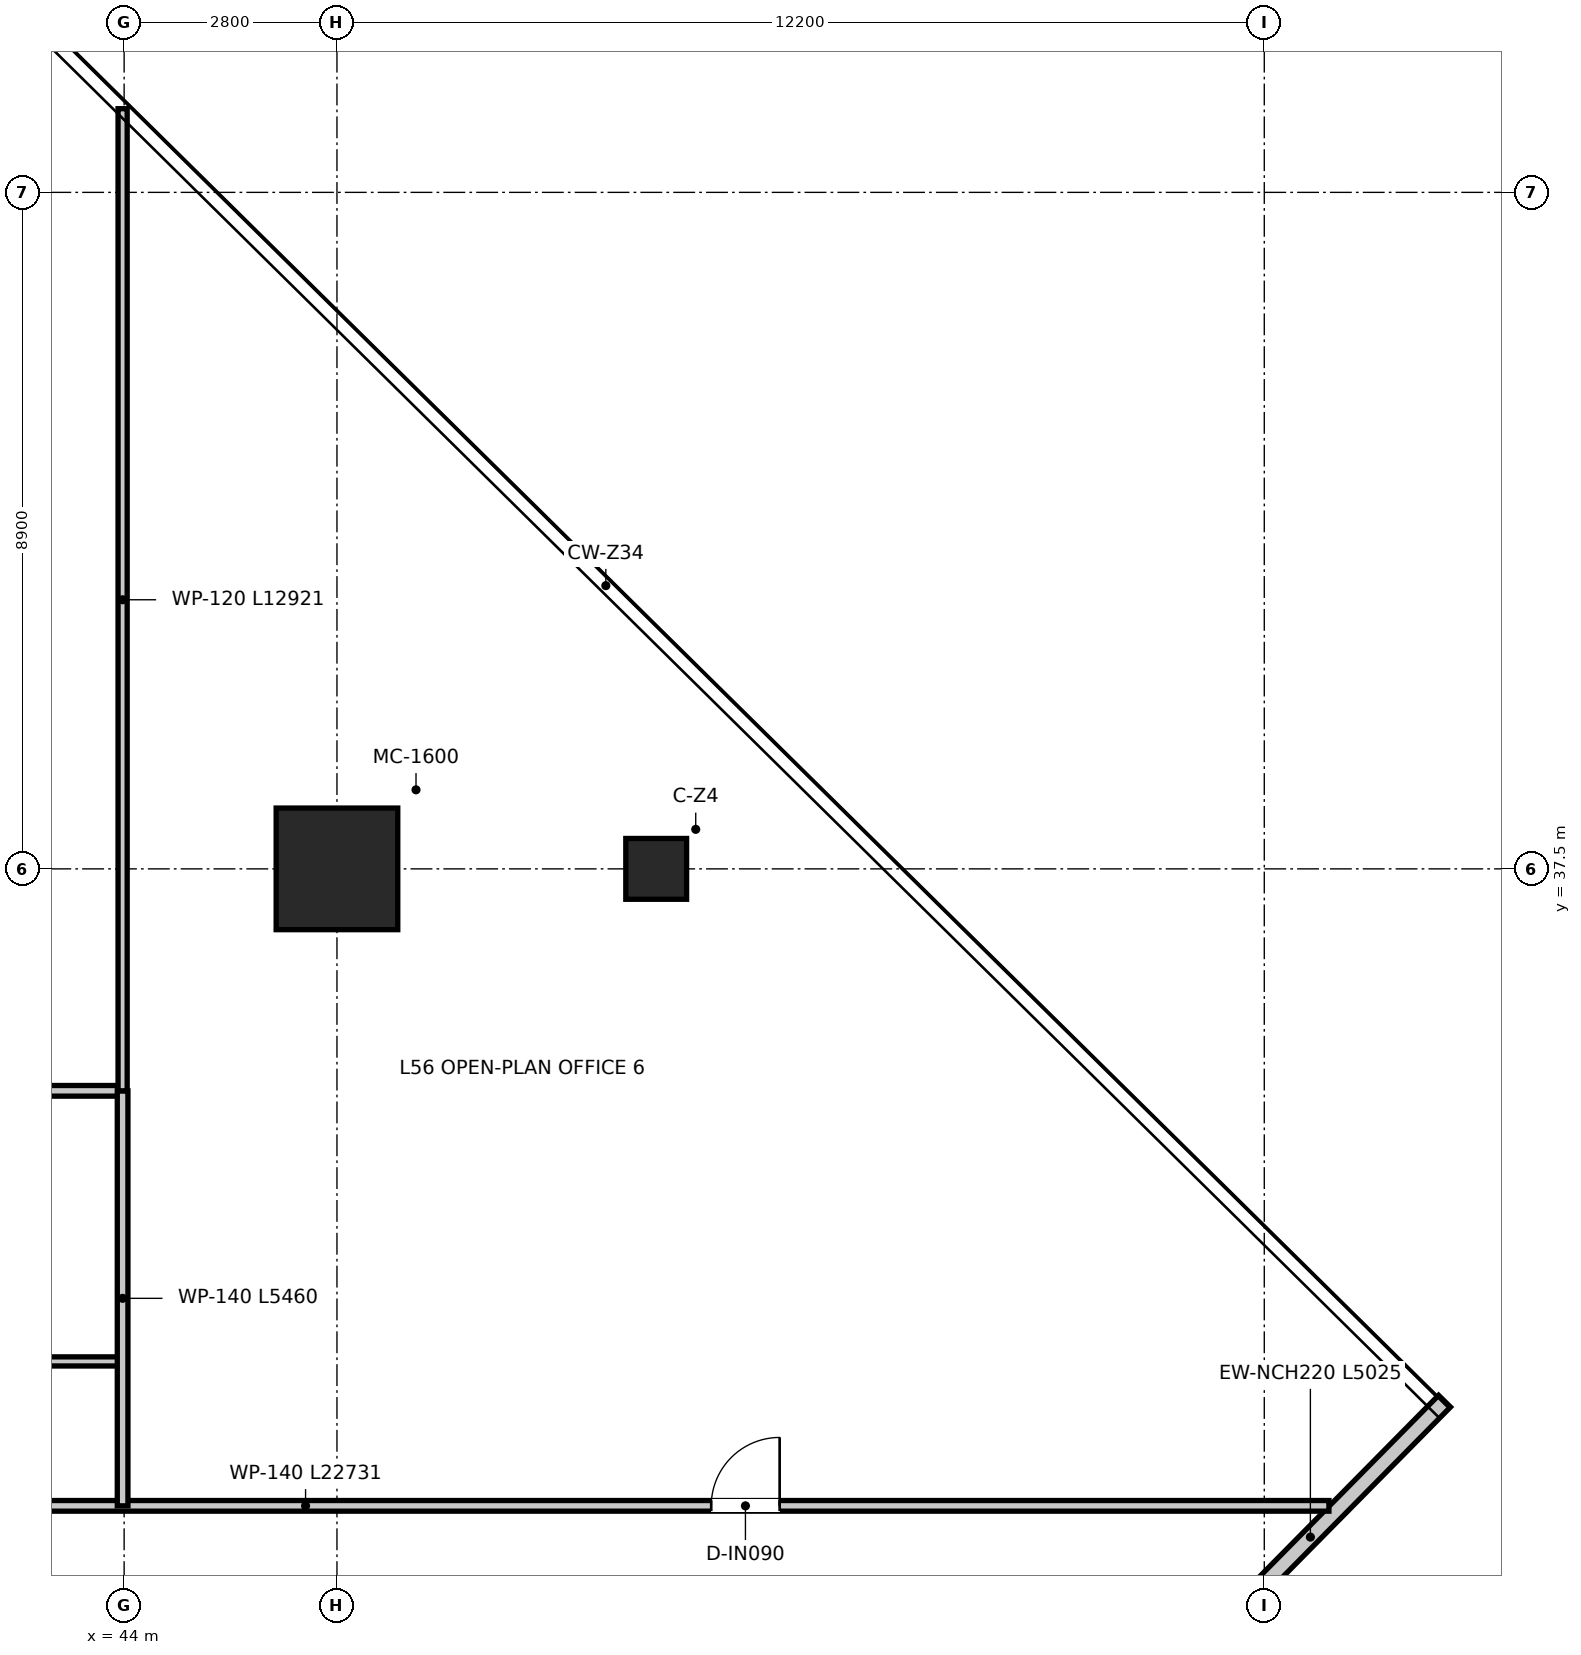
"""IFC4 building model, lengths in metres.
Left out: names, types, materials, properties, quantities, classifications, styles, units other than length and angle.
Written with IfcOpenShell. Run it as: python <this file> out.ifc"""

import sys

from ifc_helpers import new_model, si_unit, direction, frame, frame_2d, origin, origin_2d, place, context, subcontext, project, spatial, rectangle, extrude, source, transform, mapped, element, fill, save


model = new_model("IFC4")
c1 = context("Model", 3, precision=1e-05, world=origin(), true_north=direction((0.0, 1.0)))
c2 = subcontext(c1, "Body", "Model", "MODEL_VIEW")
j1 = project(units=[si_unit("LENGTHUNIT", "METRE"), si_unit("PLANEANGLEUNIT", "RADIAN")], contexts=[c1])
p1 = place(None, origin())
s1 = spatial("IfcSite", under=j1, at=p1, CompositionType="ELEMENT")
p2 = place(p1, origin())
s2 = spatial("IfcBuilding", under=s1, at=p2, CompositionType="ELEMENT")
p3 = place(p2, frame((0.0, 0.0, 231.0)))
s3 = spatial("IfcBuildingStorey", under=s2, at=p3, CompositionType="ELEMENT", Elevation=231.0)
m1 = source(origin(), c2, "Body", "SweptSolid", [
    extrude(rectangle(XDim=1.6, YDim=1.6, at=origin_2d()), origin(), (0.0, 0.0, 1.0), 3.95),
])
p4 = place(p3, frame((46.8, 37.5, 0.0), z_axis=(0.0, 0.0, 1.0), x_axis=(1.0, 0.0, 0.0)))
e1 = element("IfcColumn", 1, at=p4, inside=s3, PredefinedType="USERDEFINED", context=c2, shape_type="MappedRepresentation", body=[
    mapped(m1, transform((0.0, 0.0, 0.0), x_axis=(1.0, 0.0, 0.0), y_axis=(0.0, 1.0, 0.0), z_axis=(0.0, 0.0, 1.0), scale=1.0)),
])
m2 = source(origin(), c2, "Body", "SweptSolid", [
    extrude(rectangle(XDim=0.8, YDim=0.8, at=origin_2d()), origin(), (0.0, 0.0, 1.0), 3.95),
])
p5 = place(p3, frame((51.0, 37.5, 0.0), z_axis=(0.0, 0.0, 1.0), x_axis=(1.0, 0.0, 0.0)))
e2 = element("IfcColumn", 2, at=p5, inside=s3, PredefinedType="COLUMN", context=c2, shape_type="MappedRepresentation", body=[
    mapped(m2, transform((0.0, 0.0, 0.0), x_axis=(1.0, 0.0, 0.0), y_axis=(0.0, 1.0, 0.0), z_axis=(0.0, 0.0, 1.0), scale=1.0)),
])
p6 = place(p3, frame((57.842, 26.921, 0.0), z_axis=(0.0, 0.0, 1.0), x_axis=(0.702451626199, 0.711731489292, 0.0)))
e3 = element("IfcWall", 3, at=p6, inside=s3, PredefinedType="ELEMENTEDWALL", context=c2, shape_type="SweptSolid", body=[
    extrude(rectangle(XDim=5.025, YDim=0.22, at=frame_2d((2.512, 0.0))), origin(), (0.0, 0.0, 1.0), 3.67),
])
p7 = place(p3, frame((37.12, 29.12, 0.0), z_axis=(0.0, 0.0, 1.0), x_axis=(1.0, 0.0, 0.0)))
e4 = element("IfcWall", 4, at=p7, inside=s3, PredefinedType="PARTITIONING", context=c2, shape_type="SweptSolid", body=[
    extrude(rectangle(XDim=22.73, YDim=0.14, at=frame_2d((11.365, 0.0))), origin(), (0.0, 0.0, 1.0), 3.03),
])
p8 = place(p7, frame((3.03, 0.0, 0.0)))
e5 = element("IfcOpeningElement", 5, at=p8, cuts=e4, PredefinedType="OPENING", context=c2, shape_type="SweptSolid", body=[
    extrude(rectangle(XDim=0.9, YDim=2.1, at=frame_2d((0.45, 1.05))), frame((0.0, 0.08, 0.0), z_axis=(0.0, -1.0, 0.0), x_axis=(1.0, 0.0, 0.0)), (0.0, 0.0, 1.0), 0.16),
])
p9 = place(p7, frame((14.604, 0.0, 0.0)))
e6 = element("IfcOpeningElement", 6, at=p9, cuts=e4, PredefinedType="OPENING", context=c2, shape_type="SweptSolid", body=[
    extrude(rectangle(XDim=0.9, YDim=2.1, at=frame_2d((0.45, 1.05))), frame((0.0, 0.08, 0.0), z_axis=(0.0, -1.0, 0.0), x_axis=(1.0, 0.0, 0.0)), (0.0, 0.0, 1.0), 0.16),
])
p10 = place(p3, frame((37.12, 31.02, 0.0), z_axis=(0.0, 0.0, 1.0), x_axis=(1.0, 0.0, 0.0)))
e7 = element("IfcWall", 7, at=p10, inside=s3, PredefinedType="PARTITIONING", context=c2, shape_type="SweptSolid", body=[
    extrude(rectangle(XDim=6.86, YDim=0.12, at=frame_2d((3.43, 0.0))), origin(), (0.0, 0.0, 1.0), 3.18),
])
p11 = place(p3, frame((37.12, 34.58, 0.0), z_axis=(0.0, 0.0, 1.0), x_axis=(1.0, 0.0, 0.0)))
e8 = element("IfcWall", 8, at=p11, inside=s3, PredefinedType="PARTITIONING", context=c2, shape_type="SweptSolid", body=[
    extrude(rectangle(XDim=6.86, YDim=0.14, at=frame_2d((3.43, 0.0))), origin(), (0.0, 0.0, 1.0), 3.18),
])
p12 = place(p3, frame((43.98, 29.12, 0.0), z_axis=(0.0, 0.0, 1.0), x_axis=(0.0, 1.0, 0.0)))
e9 = element("IfcWall", 9, at=p12, inside=s3, PredefinedType="PARTITIONING", context=c2, shape_type="SweptSolid", body=[
    extrude(rectangle(XDim=5.46, YDim=0.14, at=frame_2d((2.73, 0.0))), origin(), (0.0, 0.0, 1.0), 3.37),
])
p13 = place(p3, frame((43.98, 34.58, 0.0), z_axis=(0.0, 0.0, 1.0), x_axis=(0.0, 1.0, 0.0)))
e10 = element("IfcWall", 10, at=p13, inside=s3, PredefinedType="PARTITIONING", context=c2, shape_type="SweptSolid", body=[
    extrude(rectangle(XDim=12.921, YDim=0.12, at=frame_2d((6.46, 0.0))), origin(), (0.0, 0.0, 1.0), 3.03),
])
p14 = place(p9, origin())
e11 = element("IfcDoor", 11, at=p14, inside=s3, OperationType="SINGLE_SWING_RIGHT", PredefinedType="DOOR", context=c2, shape_type="SweptSolid", body=[
    extrude(rectangle(XDim=0.9, YDim=2.1, at=frame_2d((0.45, 1.05))), frame((0.0, 0.025, 0.0), z_axis=(0.0, -1.0, 0.0), x_axis=(1.0, 0.0, 0.0)), (0.0, 0.0, 1.0), 0.05),
])
fill(e6, e11)
save(model, sys.argv[1])
